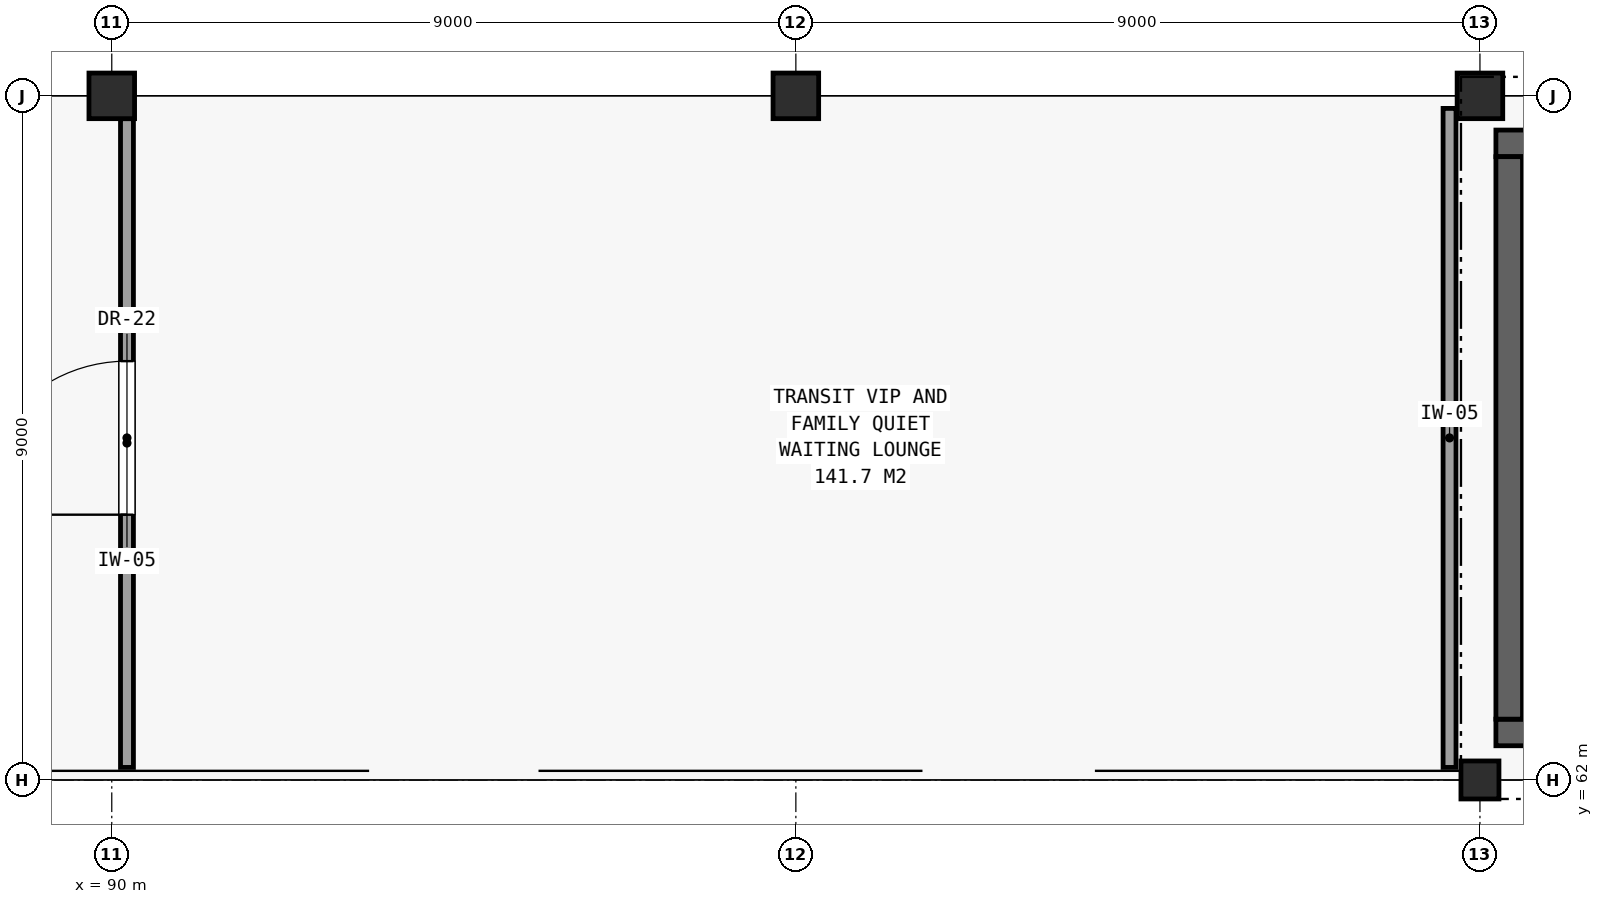
"""IFC4 building model, lengths in metres.
Left out: names, types, materials, properties, quantities, classifications, styles, units other than length and angle.
Written with IfcOpenShell. Run it as: python <this file> out.ifc"""

import sys

from ifc_helpers import new_model, si_unit, direction, frame, frame_2d, origin, origin_2d, place, context, subcontext, project, spatial, rectangle, hollow_rectangle, extrude, element, fill, save


model = new_model("IFC4")
c1 = context("Model", 3, precision=1e-05, world=origin(), true_north=direction((0.0, 1.0)))
c2 = subcontext(c1, "Body", "Model", "MODEL_VIEW")
j1 = project(units=[si_unit("LENGTHUNIT", "METRE"), si_unit("PLANEANGLEUNIT", "RADIAN")], contexts=[c1])
p1 = place(None, origin())
s1 = spatial("IfcSite", under=j1, at=p1, CompositionType="ELEMENT")
p2 = place(p1, origin())
s2 = spatial("IfcBuilding", under=s1, at=p2, CompositionType="ELEMENT")
p3 = place(p2, frame((0.0, 0.0, 5.1)))
s3 = spatial("IfcBuildingStorey", under=s2, at=p3, CompositionType="ELEMENT", Elevation=5.1)
for number, where, z_axis, x_axis in (
    (1, (90.0, 71.0, 0.0), (0.0, 0.0, 1.0), (1.0, 0.0, 0.0)),
    (2, (99.0, 71.0, 0.0), (0.0, 0.0, 1.0), (1.0, 0.0, 0.0)),
):
    element("IfcColumn", number, at=place(p3, frame(where, z_axis=z_axis, x_axis=x_axis)), inside=s3, PredefinedType="COLUMN", context=c2, shape_type="SweptSolid", body=[
        extrude(hollow_rectangle(XDim=0.6, YDim=0.6, WallThickness=0.032, at=origin_2d()), origin(), (0.0, 0.0, 1.0), 4.2),
    ])
p4 = place(p3, frame((108.0, 62.0, 0.0), z_axis=(0.0, 0.0, 1.0), x_axis=(1.0, 0.0, 0.0)))
e3 = element("IfcColumn", 3, at=p4, inside=s3, PredefinedType="COLUMN", context=c2, shape_type="SweptSolid", body=[
    extrude(hollow_rectangle(XDim=0.5, YDim=0.5, WallThickness=0.025, at=origin_2d()), origin(), (0.0, 0.0, 1.0), 4.14),
])
p5 = place(p3, frame((108.0, 71.0, 0.0), z_axis=(0.0, 0.0, 1.0), x_axis=(1.0, 0.0, 0.0)))
e4 = element("IfcColumn", 4, at=p5, inside=s3, PredefinedType="COLUMN", context=c2, shape_type="SweptSolid", body=[
    extrude(hollow_rectangle(XDim=0.6, YDim=0.6, WallThickness=0.032, at=origin_2d()), origin(), (0.0, 0.0, 1.0), 4.2),
])
for number, where, z_axis, x_axis in (
    (5, (108.21, 62.625, 0.0), (0.0, 0.0, 1.0), (1.0, 0.0, 0.0)),
    (6, (108.21, 70.375, 0.0), (0.0, 0.0, 1.0), (1.0, 0.0, 0.0)),
):
    element("IfcWall", number, at=place(p3, frame(where, z_axis=z_axis, x_axis=x_axis)), inside=s3, PredefinedType="SHEAR", context=c2, shape_type="SweptSolid", body=[
        extrude(rectangle(XDim=3.98, YDim=0.35, at=frame_2d((1.99, 0.0))), origin(), (0.0, 0.0, 1.0), 3.48),
    ])
p6 = place(p3, frame((108.385, 62.8, 0.0), z_axis=(0.0, 0.0, 1.0), x_axis=(0.0, 1.0, 0.0)))
e7 = element("IfcWall", 7, at=p6, inside=s3, PredefinedType="SHEAR", context=c2, shape_type="SweptSolid", body=[
    extrude(rectangle(XDim=7.4, YDim=0.35, at=frame_2d((3.7, 0.0))), origin(), (0.0, 0.0, 1.0), 3.48),
])
p7 = place(p3, frame((90.2, 62.165, 0.0), z_axis=(0.0, 0.0, 1.0), x_axis=(0.0, 1.0, 0.0)))
e8 = element("IfcWall", 8, at=p7, inside=s3, PredefinedType="PARTITIONING", context=c2, shape_type="SweptSolid", body=[
    extrude(rectangle(XDim=8.535, YDim=0.17, at=frame_2d((4.268, 0.0))), origin(), (0.0, 0.0, 1.0), 3.48),
])
p8 = place(p7, frame((3.325, 0.0, 0.0)))
e9 = element("IfcOpeningElement", 9, at=p8, cuts=e8, PredefinedType="OPENING", context=c2, shape_type="SweptSolid", body=[
    extrude(rectangle(XDim=2.02, YDim=2.5, at=frame_2d((1.01, 1.25))), frame((0.0, 0.096, 0.0), z_axis=(0.0, -1.0, 0.0), x_axis=(1.0, 0.0, 0.0)), (0.0, 0.0, 1.0), 0.192),
])
p9 = place(p3, frame((107.6, 62.165, 0.0), z_axis=(0.0, 0.0, 1.0), x_axis=(0.0, 1.0, 0.0)))
e10 = element("IfcWall", 10, at=p9, inside=s3, PredefinedType="PARTITIONING", context=c2, shape_type="SweptSolid", body=[
    extrude(rectangle(XDim=8.67, YDim=0.17, at=frame_2d((4.335, 0.0))), origin(), (0.0, 0.0, 1.0), 3.48),
])
p10 = place(p8, origin())
e11 = element("IfcDoor", 11, at=p10, inside=s3, OperationType="SINGLE_SWING_LEFT", PredefinedType="DOOR", context=c2, shape_type="SweptSolid", body=[
    extrude(rectangle(XDim=2.02, YDim=2.5, at=frame_2d((1.01, 1.25))), frame((0.0, 0.025, 0.0), z_axis=(0.0, -1.0, 0.0), x_axis=(1.0, 0.0, 0.0)), (0.0, 0.0, 1.0), 0.05),
])
fill(e9, e11)
save(model, sys.argv[1])
